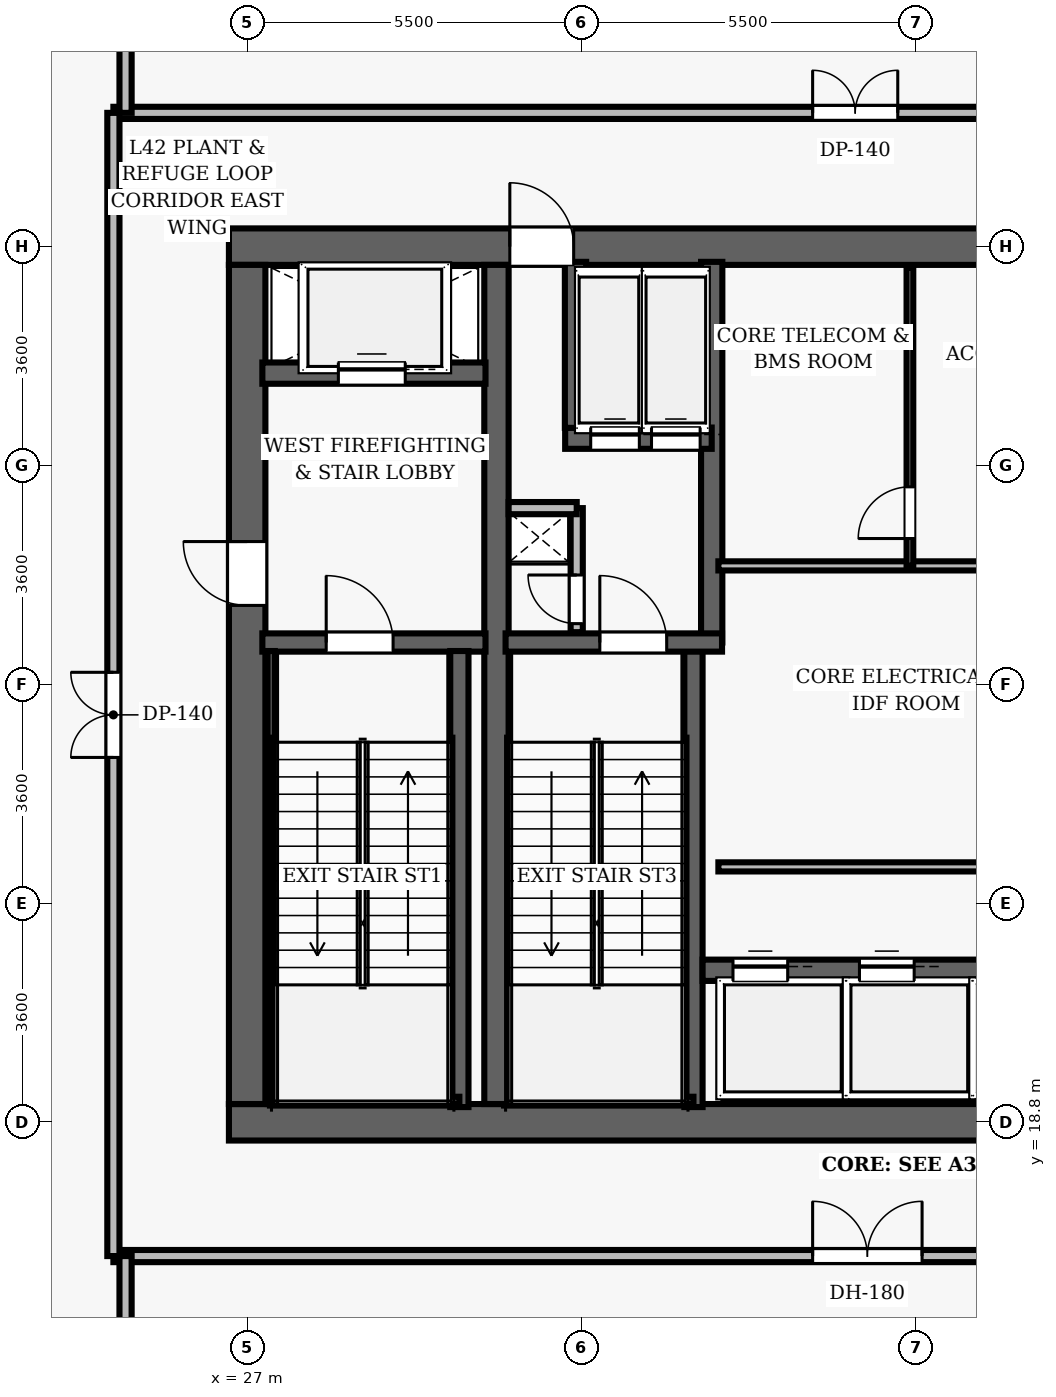
"""IFC4 building model, lengths in metres.
Left out: names, types, materials, properties, quantities, classifications, styles, units other than length and angle.
Written with IfcOpenShell. Run it as: python <this file> out.ifc"""

import sys

from ifc_helpers import new_model, si_unit, direction, frame, frame_2d, origin, place, context, subcontext, project, spatial, rectangle, extrude, element, fill, save


model = new_model("IFC4")
c1 = context("Model", 3, precision=1e-05, world=origin(), true_north=direction((0.0, 1.0)))
c2 = subcontext(c1, "Body", "Model", "MODEL_VIEW")
j1 = project(units=[si_unit("LENGTHUNIT", "METRE"), si_unit("PLANEANGLEUNIT", "RADIAN")], contexts=[c1])
p1 = place(None, origin())
s1 = spatial("IfcSite", under=j1, at=p1, CompositionType="ELEMENT")
p2 = place(p1, origin())
s2 = spatial("IfcBuilding", under=s1, at=p2, CompositionType="ELEMENT")
p3 = place(p2, frame((0.0, 0.0, 165.8)))
s3 = spatial("IfcBuildingStorey", under=s2, at=p3, CompositionType="ELEMENT", Elevation=165.8)
p4 = place(p3, frame((26.7, 18.8, 0.0), z_axis=(0.0, 0.0, 1.0), x_axis=(1.0, 0.0, 0.0)))
e1 = element("IfcWall", 1, at=p4, inside=s3, PredefinedType="SHEAR", context=c2, shape_type="SweptSolid", body=[
    extrude(rectangle(XDim=22.6, YDim=0.6, at=frame_2d((11.3, 0.0))), origin(), (0.0, 0.0, 1.0), 5.4),
])
p5 = place(p4, frame((14.52, 0.0, 0.0)))
e2 = element("IfcOpeningElement", 2, at=p5, cuts=e1, PredefinedType="OPENING", context=c2, shape_type="SweptSolid", body=[
    extrude(rectangle(XDim=1.05, YDim=2.15, at=frame_2d((0.525, 1.075))), frame((0.0, 0.31, 0.0), z_axis=(0.0, -1.0, 0.0), x_axis=(1.0, 0.0, 0.0)), (0.0, 0.0, 1.0), 0.62),
])
p6 = place(p3, frame((26.7, 33.2, 0.0), z_axis=(0.0, 0.0, 1.0), x_axis=(1.0, 0.0, 0.0)))
e3 = element("IfcWall", 3, at=p6, inside=s3, PredefinedType="SHEAR", context=c2, shape_type="SweptSolid", body=[
    extrude(rectangle(XDim=22.6, YDim=0.6, at=frame_2d((11.3, 0.0))), origin(), (0.0, 0.0, 1.0), 5.4),
])
p7 = place(p6, frame((4.62, 0.0, 0.0)))
e4 = element("IfcOpeningElement", 4, at=p7, cuts=e3, PredefinedType="OPENING", context=c2, shape_type="SweptSolid", body=[
    extrude(rectangle(XDim=1.05, YDim=2.15, at=frame_2d((0.525, 1.075))), frame((0.0, 0.31, 0.0), z_axis=(0.0, -1.0, 0.0), x_axis=(1.0, 0.0, 0.0)), (0.0, 0.0, 1.0), 0.62),
])
p8 = place(p6, frame((14.52, 0.0, 0.0)))
e5 = element("IfcOpeningElement", 5, at=p8, cuts=e3, PredefinedType="OPENING", context=c2, shape_type="SweptSolid", body=[
    extrude(rectangle(XDim=1.05, YDim=2.15, at=frame_2d((0.525, 1.075))), frame((0.0, 0.31, 0.0), z_axis=(0.0, -1.0, 0.0), x_axis=(1.0, 0.0, 0.0)), (0.0, 0.0, 1.0), 0.62),
])
p9 = place(p3, frame((27.0, 19.1, 0.0), z_axis=(0.0, 0.0, 1.0), x_axis=(0.0, 1.0, 0.0)))
e6 = element("IfcWall", 6, at=p9, inside=s3, PredefinedType="SHEAR", context=c2, shape_type="SweptSolid", body=[
    extrude(rectangle(XDim=13.8, YDim=0.6, at=frame_2d((6.9, 0.0))), origin(), (0.0, 0.0, 1.0), 5.4),
])
p10 = place(p9, frame((8.2, 0.0, 0.0)))
e7 = element("IfcOpeningElement", 7, at=p10, cuts=e6, PredefinedType="OPENING", context=c2, shape_type="SweptSolid", body=[
    extrude(rectangle(XDim=1.05, YDim=2.15, at=frame_2d((0.525, 1.075))), frame((0.0, 0.31, 0.0), z_axis=(0.0, -1.0, 0.0), x_axis=(1.0, 0.0, 0.0)), (0.0, 0.0, 1.0), 0.62),
])
p11 = place(p3, frame((31.1, 19.1, 0.0), z_axis=(0.0, 0.0, 1.0), x_axis=(0.0, 1.0, 0.0)))
e8 = element("IfcWall", 8, at=p11, inside=s3, PredefinedType="SHEAR", context=c2, shape_type="SweptSolid", body=[
    extrude(rectangle(XDim=13.8, YDim=0.4, at=frame_2d((6.9, 0.0))), origin(), (0.0, 0.0, 1.0), 5.4),
])
p12 = place(p3, frame((27.25, 26.69, 0.0), z_axis=(0.0, 0.0, 1.0), x_axis=(1.0, 0.0, 0.0)))
e9 = element("IfcWall", 9, at=p12, inside=s3, PredefinedType="SHEAR", context=c2, shape_type="SweptSolid", body=[
    extrude(rectangle(XDim=3.67, YDim=0.3, at=frame_2d((1.835, 0.0))), origin(), (0.0, 0.0, 1.0), 5.4),
])
p13 = place(p12, frame((1.05, 0.0, 0.0)))
e10 = element("IfcOpeningElement", 10, at=p13, cuts=e9, PredefinedType="OPENING", context=c2, shape_type="SweptSolid", body=[
    extrude(rectangle(XDim=1.1, YDim=2.15, at=frame_2d((0.55, 1.075))), frame((0.0, 0.16, 0.0), z_axis=(0.0, -1.0, 0.0), x_axis=(1.0, 0.0, 0.0)), (0.0, 0.0, 1.0), 0.32),
])
p14 = place(p3, frame((30.49, 19.05, 0.0), z_axis=(0.0, 0.0, 1.0), x_axis=(0.0, 1.0, 0.0)))
e11 = element("IfcWall", 11, at=p14, inside=s3, PredefinedType="SHEAR", context=c2, shape_type="SweptSolid", body=[
    extrude(rectangle(XDim=7.5, YDim=0.3, at=frame_2d((3.75, 0.0))), origin(), (0.0, 0.0, 1.0), 5.4),
])
p15 = place(p3, frame((27.395, 19.1, 0.0), z_axis=(0.0, 0.0, 1.0), x_axis=(0.0, 1.0, 0.0)))
e12 = element("IfcWall", 12, at=p15, inside=s3, PredefinedType="SHEAR", context=c2, shape_type="SweptSolid", body=[
    extrude(rectangle(XDim=7.45, YDim=0.12, at=frame_2d((3.725, 0.0))), origin(), (0.0, 0.0, 1.0), 5.4),
])
p16 = place(p3, frame((27.395, 19.16, 0.0), z_axis=(0.0, 0.0, 1.0), x_axis=(1.0, 0.0, 0.0)))
e13 = element("IfcWall", 13, at=p16, inside=s3, PredefinedType="SHEAR", context=c2, shape_type="SweptSolid", body=[
    extrude(rectangle(XDim=3.095, YDim=0.12, at=frame_2d((1.547, 0.0))), origin(), (0.0, 0.0, 1.0), 5.4),
])
p17 = place(p3, frame((27.25, 31.12, 0.0), z_axis=(0.0, 0.0, 1.0), x_axis=(1.0, 0.0, 0.0)))
e14 = element("IfcWall", 14, at=p17, inside=s3, PredefinedType="SHEAR", context=c2, shape_type="SweptSolid", body=[
    extrude(rectangle(XDim=3.67, YDim=0.35, at=frame_2d((1.835, 0.0))), origin(), (0.0, 0.0, 1.0), 4.04),
])
p18 = place(p17, frame((1.25, 0.0, 0.0)))
e15 = element("IfcOpeningElement", 15, at=p18, cuts=e14, PredefinedType="OPENING", context=c2, shape_type="SweptSolid", body=[
    extrude(rectangle(XDim=1.1, YDim=2.15, at=frame_2d((0.55, 1.075))), frame((0.0, 0.185, 0.0), z_axis=(0.0, -1.0, 0.0), x_axis=(1.0, 0.0, 0.0)), (0.0, 0.0, 1.0), 0.37),
])
p19 = place(p3, frame((34.34, 19.05, 0.0), z_axis=(0.0, 0.0, 1.0), x_axis=(0.0, 1.0, 0.0)))
e16 = element("IfcWall", 16, at=p19, inside=s3, PredefinedType="SHEAR", context=c2, shape_type="SweptSolid", body=[
    extrude(rectangle(XDim=7.5, YDim=0.3, at=frame_2d((3.75, 0.0))), origin(), (0.0, 0.0, 1.0), 5.4),
])
p20 = place(p3, frame((34.64, 26.69, 0.0), z_axis=(0.0, 0.0, 1.0), x_axis=(0.0, 1.0, 0.0)))
e17 = element("IfcWall", 17, at=p20, inside=s3, PredefinedType="SHEAR", context=c2, shape_type="SweptSolid", body=[
    extrude(rectangle(XDim=6.26, YDim=0.35, at=frame_2d((3.13, 0.0))), origin(), (0.0, 0.0, 1.0), 5.4),
])
p21 = place(p3, frame((31.25, 26.69, 0.0), z_axis=(0.0, 0.0, 1.0), x_axis=(1.0, 0.0, 0.0)))
e18 = element("IfcWall", 18, at=p21, inside=s3, PredefinedType="SHEAR", context=c2, shape_type="SweptSolid", body=[
    extrude(rectangle(XDim=3.56, YDim=0.3, at=frame_2d((1.78, 0.0))), origin(), (0.0, 0.0, 1.0), 5.4),
])
p22 = place(p21, frame((1.55, 0.0, 0.0)))
e19 = element("IfcOpeningElement", 19, at=p22, cuts=e18, PredefinedType="OPENING", context=c2, shape_type="SweptSolid", body=[
    extrude(rectangle(XDim=1.1, YDim=2.15, at=frame_2d((0.55, 1.075))), frame((0.0, 0.16, 0.0), z_axis=(0.0, -1.0, 0.0), x_axis=(1.0, 0.0, 0.0)), (0.0, 0.0, 1.0), 0.32),
])
p23 = place(p3, frame((31.3, 19.16, 0.0), z_axis=(0.0, 0.0, 1.0), x_axis=(1.0, 0.0, 0.0)))
e20 = element("IfcWall", 20, at=p23, inside=s3, PredefinedType="SHEAR", context=c2, shape_type="SweptSolid", body=[
    extrude(rectangle(XDim=3.04, YDim=0.12, at=frame_2d((1.52, 0.0))), origin(), (0.0, 0.0, 1.0), 5.4),
])
p24 = place(p3, frame((32.23, 30.05, 0.0), z_axis=(0.0, 0.0, 1.0), x_axis=(1.0, 0.0, 0.0)))
e21 = element("IfcWall", 21, at=p24, inside=s3, PredefinedType="SHEAR", context=c2, shape_type="SweptSolid", body=[
    extrude(rectangle(XDim=2.41, YDim=0.35, at=frame_2d((1.205, 0.0))), origin(), (0.0, 0.0, 1.0), 4.04),
])
p25 = place(p24, frame((0.42, 0.0, 0.0)))
e22 = element("IfcOpeningElement", 22, at=p25, cuts=e21, PredefinedType="OPENING", context=c2, shape_type="SweptSolid", body=[
    extrude(rectangle(XDim=0.8, YDim=2.15, at=frame_2d((0.4, 1.075))), frame((0.0, 0.185, 0.0), z_axis=(0.0, -1.0, 0.0), x_axis=(1.0, 0.0, 0.0)), (0.0, 0.0, 1.0), 0.37),
])
p26 = place(p24, frame((1.42, 0.0, 0.0)))
e23 = element("IfcOpeningElement", 23, at=p26, cuts=e21, PredefinedType="OPENING", context=c2, shape_type="SweptSolid", body=[
    extrude(rectangle(XDim=0.8, YDim=2.15, at=frame_2d((0.4, 1.075))), frame((0.0, 0.185, 0.0), z_axis=(0.0, -1.0, 0.0), x_axis=(1.0, 0.0, 0.0)), (0.0, 0.0, 1.0), 0.37),
])
p27 = place(p3, frame((32.4, 30.22, 0.0), z_axis=(0.0, 0.0, 1.0), x_axis=(0.0, 1.0, 0.0)))
e24 = element("IfcWall", 24, at=p27, inside=s3, PredefinedType="SHEAR", context=c2, shape_type="SweptSolid", body=[
    extrude(rectangle(XDim=2.73, YDim=0.35, at=frame_2d((1.365, 0.0))), origin(), (0.0, 0.0, 1.0), 4.04),
])
p28 = place(p3, frame((32.42, 26.86, 0.0), z_axis=(0.0, 0.0, 1.0), x_axis=(0.0, 1.0, 0.0)))
e25 = element("IfcWall", 25, at=p28, inside=s3, PredefinedType="PARTITIONING", context=c2, shape_type="SweptSolid", body=[
    extrude(rectangle(XDim=2.04, YDim=0.2, at=frame_2d((1.02, 0.0))), origin(), (0.0, 0.0, 1.0), 4.04),
])
p29 = place(p28, frame((0.14, 0.0, 0.0)))
e26 = element("IfcOpeningElement", 26, at=p29, cuts=e25, PredefinedType="OPENING", context=c2, shape_type="SweptSolid", body=[
    extrude(rectangle(XDim=0.8, YDim=2.05, at=frame_2d((0.4, 1.025))), frame((0.0, 0.11, 0.0), z_axis=(0.0, -1.0, 0.0), x_axis=(1.0, 0.0, 0.0)), (0.0, 0.0, 1.0), 0.22),
])
p30 = place(p3, frame((31.3, 28.9, 0.0), z_axis=(0.0, 0.0, 1.0), x_axis=(1.0, 0.0, 0.0)))
e27 = element("IfcWall", 27, at=p30, inside=s3, PredefinedType="PARTITIONING", context=c2, shape_type="SweptSolid", body=[
    extrude(rectangle(XDim=1.12, YDim=0.2, at=frame_2d((0.56, 0.0))), origin(), (0.0, 0.0, 1.0), 4.04),
])
p31 = place(p3, frame((34.49, 21.3, 0.0), z_axis=(0.0, 0.0, 1.0), x_axis=(1.0, 0.0, 0.0)))
e28 = element("IfcWall", 28, at=p31, inside=s3, PredefinedType="SHEAR", context=c2, shape_type="SweptSolid", body=[
    extrude(rectangle(XDim=6.68, YDim=0.35, at=frame_2d((3.34, 0.0))), origin(), (0.0, 0.0, 1.0), 4.04),
])
p32 = place(p31, frame((0.5, 0.0, 0.0)))
e29 = element("IfcOpeningElement", 29, at=p32, cuts=e28, PredefinedType="OPENING", context=c2, shape_type="SweptSolid", body=[
    extrude(rectangle(XDim=0.9, YDim=2.15, at=frame_2d((0.45, 1.075))), frame((0.0, 0.185, 0.0), z_axis=(0.0, -1.0, 0.0), x_axis=(1.0, 0.0, 0.0)), (0.0, 0.0, 1.0), 0.37),
])
p33 = place(p31, frame((2.58, 0.0, 0.0)))
e30 = element("IfcOpeningElement", 30, at=p33, cuts=e28, PredefinedType="OPENING", context=c2, shape_type="SweptSolid", body=[
    extrude(rectangle(XDim=0.9, YDim=2.15, at=frame_2d((0.45, 1.075))), frame((0.0, 0.185, 0.0), z_axis=(0.0, -1.0, 0.0), x_axis=(1.0, 0.0, 0.0)), (0.0, 0.0, 1.0), 0.37),
])
p34 = place(p31, frame((4.66, 0.0, 0.0)))
e31 = element("IfcOpeningElement", 31, at=p34, cuts=e28, PredefinedType="OPENING", context=c2, shape_type="SweptSolid", body=[
    extrude(rectangle(XDim=0.9, YDim=2.15, at=frame_2d((0.45, 1.075))), frame((0.0, 0.185, 0.0), z_axis=(0.0, -1.0, 0.0), x_axis=(1.0, 0.0, 0.0)), (0.0, 0.0, 1.0), 0.37),
])
for number, where, z_axis, x_axis in (
    (32, (34.75, 23.0, 0.0), (0.0, 0.0, 1.0), (1.0, 0.0, 0.0)),
    (33, (34.75, 27.95, 0.0), (0.0, 0.0, 1.0), (1.0, 0.0, 0.0)),
):
    element("IfcWall", number, at=place(p3, frame(where, z_axis=z_axis, x_axis=x_axis)), inside=s3, PredefinedType="PARTITIONING", context=c2, shape_type="SweptSolid", body=[
        extrude(rectangle(XDim=6.25, YDim=0.15, at=frame_2d((3.125, 0.0))), origin(), (0.0, 0.0, 1.0), 4.04),
    ])
p35 = place(p3, frame((37.9, 27.95, 0.0), z_axis=(0.0, 0.0, 1.0), x_axis=(0.0, 1.0, 0.0)))
e34 = element("IfcWall", 34, at=p35, inside=s3, PredefinedType="PARTITIONING", context=c2, shape_type="SweptSolid", body=[
    extrude(rectangle(XDim=4.9, YDim=0.11, at=frame_2d((2.45, 0.0))), origin(), (0.0, 0.0, 1.0), 4.04),
])
p36 = place(p35, frame((0.45, 0.0, 0.0)))
e35 = element("IfcOpeningElement", 35, at=p36, cuts=e34, PredefinedType="OPENING", context=c2, shape_type="SweptSolid", body=[
    extrude(rectangle(XDim=0.85, YDim=2.1, at=frame_2d((0.425, 1.05))), frame((0.0, 0.065, 0.0), z_axis=(0.0, -1.0, 0.0), x_axis=(1.0, 0.0, 0.0)), (0.0, 0.0, 1.0), 0.13),
])
p37 = place(p3, frame((24.8, 35.4, 0.0), z_axis=(0.0, 0.0, 1.0), x_axis=(1.0, 0.0, 0.0)))
e36 = element("IfcWall", 36, at=p37, inside=s3, PredefinedType="PARTITIONING", context=c2, shape_type="SweptSolid", body=[
    extrude(rectangle(XDim=26.4, YDim=0.2, at=frame_2d((13.2, 0.0))), origin(), (0.0, 0.0, 1.0), 4.04),
])
p38 = place(p37, frame((11.5, 0.0, 0.0)))
e37 = element("IfcOpeningElement", 37, at=p38, cuts=e36, PredefinedType="OPENING", context=c2, shape_type="SweptSolid", body=[
    extrude(rectangle(XDim=1.4, YDim=2.25, at=frame_2d((0.7, 1.125))), frame((0.0, 0.11, 0.0), z_axis=(0.0, -1.0, 0.0), x_axis=(1.0, 0.0, 0.0)), (0.0, 0.0, 1.0), 0.22),
])
p39 = place(p3, frame((24.8, 16.6, 0.0), z_axis=(0.0, 0.0, 1.0), x_axis=(1.0, 0.0, 0.0)))
e38 = element("IfcWall", 38, at=p39, inside=s3, PredefinedType="PARTITIONING", context=c2, shape_type="SweptSolid", body=[
    extrude(rectangle(XDim=26.4, YDim=0.2, at=frame_2d((13.2, 0.0))), origin(), (0.0, 0.0, 1.0), 4.04),
])
p40 = place(p39, frame((11.5, 0.0, 0.0)))
e39 = element("IfcOpeningElement", 39, at=p40, cuts=e38, PredefinedType="OPENING", context=c2, shape_type="SweptSolid", body=[
    extrude(rectangle(XDim=1.8, YDim=2.35, at=frame_2d((0.9, 1.175))), frame((0.0, 0.11, 0.0), z_axis=(0.0, -1.0, 0.0), x_axis=(1.0, 0.0, 0.0)), (0.0, 0.0, 1.0), 0.22),
])
p41 = place(p3, frame((24.8, 16.6, 0.0), z_axis=(0.0, 0.0, 1.0), x_axis=(0.0, 1.0, 0.0)))
e40 = element("IfcWall", 40, at=p41, inside=s3, PredefinedType="PARTITIONING", context=c2, shape_type="SweptSolid", body=[
    extrude(rectangle(XDim=18.8, YDim=0.2, at=frame_2d((9.4, 0.0))), origin(), (0.0, 0.0, 1.0), 4.04),
])
p42 = place(p41, frame((8.2, 0.0, 0.0)))
e41 = element("IfcOpeningElement", 41, at=p42, cuts=e40, PredefinedType="OPENING", context=c2, shape_type="SweptSolid", body=[
    extrude(rectangle(XDim=1.4, YDim=2.25, at=frame_2d((0.7, 1.125))), frame((0.0, 0.11, 0.0), z_axis=(0.0, -1.0, 0.0), x_axis=(1.0, 0.0, 0.0)), (0.0, 0.0, 1.0), 0.22),
])
p43 = place(p3, frame((25.0, 8.63, 0.0), z_axis=(0.0, 0.0, 1.0), x_axis=(0.0, 1.0, 0.0)))
e42 = element("IfcWall", 42, at=p43, inside=s3, PredefinedType="PARTITIONING", context=c2, shape_type="SweptSolid", body=[
    extrude(rectangle(XDim=7.97, YDim=0.2, at=frame_2d((3.985, 0.0))), origin(), (0.0, 0.0, 1.0), 4.04),
])
p44 = place(p3, frame((25.0, 35.4, 0.0), z_axis=(0.0, 0.0, 1.0), x_axis=(0.0, 1.0, 0.0)))
e43 = element("IfcWall", 43, at=p44, inside=s3, PredefinedType="PARTITIONING", context=c2, shape_type="SweptSolid", body=[
    extrude(rectangle(XDim=12.146, YDim=0.2, at=frame_2d((6.073, 0.0))), origin(), (0.0, 0.0, 1.0), 4.04),
])
p45 = place(p13, origin())
e44 = element("IfcDoor", 44, at=p45, inside=s3, OperationType="SINGLE_SWING_LEFT", PredefinedType="DOOR", context=c2, shape_type="SweptSolid", body=[
    extrude(rectangle(XDim=1.1, YDim=2.15, at=frame_2d((0.55, 1.075))), frame((0.0, 0.025, 0.0), z_axis=(0.0, -1.0, 0.0), x_axis=(1.0, 0.0, 0.0)), (0.0, 0.0, 1.0), 0.05),
])
fill(e10, e44)
p46 = place(p10, origin())
e45 = element("IfcDoor", 45, at=p46, inside=s3, OperationType="SINGLE_SWING_RIGHT", PredefinedType="DOOR", context=c2, shape_type="SweptSolid", body=[
    extrude(rectangle(XDim=1.05, YDim=2.15, at=frame_2d((0.525, 1.075))), frame((0.0, 0.025, 0.0), z_axis=(0.0, -1.0, 0.0), x_axis=(1.0, 0.0, 0.0)), (0.0, 0.0, 1.0), 0.05),
])
fill(e7, e45)
p47 = place(p22, origin())
e46 = element("IfcDoor", 46, at=p47, inside=s3, OperationType="SINGLE_SWING_LEFT", PredefinedType="DOOR", context=c2, shape_type="SweptSolid", body=[
    extrude(rectangle(XDim=1.1, YDim=2.15, at=frame_2d((0.55, 1.075))), frame((0.0, 0.025, 0.0), z_axis=(0.0, -1.0, 0.0), x_axis=(1.0, 0.0, 0.0)), (0.0, 0.0, 1.0), 0.05),
])
fill(e19, e46)
p48 = place(p29, origin())
e47 = element("IfcDoor", 47, at=p48, inside=s3, OperationType="SINGLE_SWING_RIGHT", PredefinedType="DOOR", context=c2, shape_type="SweptSolid", body=[
    extrude(rectangle(XDim=0.8, YDim=2.05, at=frame_2d((0.4, 1.025))), frame((0.0, 0.025, 0.0), z_axis=(0.0, -1.0, 0.0), x_axis=(1.0, 0.0, 0.0)), (0.0, 0.0, 1.0), 0.05),
])
fill(e26, e47)
p49 = place(p7, origin())
e48 = element("IfcDoor", 48, at=p49, inside=s3, OperationType="SINGLE_SWING_LEFT", PredefinedType="DOOR", context=c2, shape_type="SweptSolid", body=[
    extrude(rectangle(XDim=1.05, YDim=2.15, at=frame_2d((0.525, 1.075))), frame((0.0, 0.025, 0.0), z_axis=(0.0, -1.0, 0.0), x_axis=(1.0, 0.0, 0.0)), (0.0, 0.0, 1.0), 0.05),
])
fill(e4, e48)
p50 = place(p36, origin())
e49 = element("IfcDoor", 49, at=p50, inside=s3, OperationType="SINGLE_SWING_LEFT", PredefinedType="DOOR", context=c2, shape_type="SweptSolid", body=[
    extrude(rectangle(XDim=0.85, YDim=2.1, at=frame_2d((0.425, 1.05))), frame((0.0, 0.025, 0.0), z_axis=(0.0, -1.0, 0.0), x_axis=(1.0, 0.0, 0.0)), (0.0, 0.0, 1.0), 0.05),
])
fill(e35, e49)
p51 = place(p40, origin())
e50 = element("IfcDoor", 50, at=p51, inside=s3, OperationType="DOUBLE_DOOR_SINGLE_SWING", PredefinedType="DOOR", context=c2, shape_type="SweptSolid", body=[
    extrude(rectangle(XDim=1.8, YDim=2.35, at=frame_2d((0.9, 1.175))), frame((0.0, 0.025, 0.0), z_axis=(0.0, -1.0, 0.0), x_axis=(1.0, 0.0, 0.0)), (0.0, 0.0, 1.0), 0.05),
])
fill(e39, e50)
p52 = place(p38, origin())
e51 = element("IfcDoor", 51, at=p52, inside=s3, OperationType="DOUBLE_DOOR_SINGLE_SWING", PredefinedType="DOOR", context=c2, shape_type="SweptSolid", body=[
    extrude(rectangle(XDim=1.4, YDim=2.25, at=frame_2d((0.7, 1.125))), frame((0.0, 0.025, 0.0), z_axis=(0.0, -1.0, 0.0), x_axis=(1.0, 0.0, 0.0)), (0.0, 0.0, 1.0), 0.05),
])
fill(e37, e51)
p53 = place(p42, origin())
e52 = element("IfcDoor", 52, at=p53, inside=s3, OperationType="DOUBLE_DOOR_SINGLE_SWING", PredefinedType="DOOR", context=c2, shape_type="SweptSolid", body=[
    extrude(rectangle(XDim=1.4, YDim=2.25, at=frame_2d((0.7, 1.125))), frame((0.0, 0.025, 0.0), z_axis=(0.0, -1.0, 0.0), x_axis=(1.0, 0.0, 0.0)), (0.0, 0.0, 1.0), 0.05),
])
fill(e41, e52)
p54 = place(p32, origin())
e53 = element("IfcDoor", 53, at=p54, inside=s3, OperationType="SLIDING_TO_LEFT", PredefinedType="DOOR", context=c2, shape_type="SweptSolid", body=[
    extrude(rectangle(XDim=0.9, YDim=2.15, at=frame_2d((0.45, 1.075))), frame((0.0, 0.025, 0.0), z_axis=(0.0, -1.0, 0.0), x_axis=(1.0, 0.0, 0.0)), (0.0, 0.0, 1.0), 0.05),
])
fill(e29, e53)
p55 = place(p33, origin())
e54 = element("IfcDoor", 54, at=p55, inside=s3, OperationType="SLIDING_TO_LEFT", PredefinedType="DOOR", context=c2, shape_type="SweptSolid", body=[
    extrude(rectangle(XDim=0.9, YDim=2.15, at=frame_2d((0.45, 1.075))), frame((0.0, 0.025, 0.0), z_axis=(0.0, -1.0, 0.0), x_axis=(1.0, 0.0, 0.0)), (0.0, 0.0, 1.0), 0.05),
])
fill(e30, e54)
p56 = place(p18, origin())
e55 = element("IfcDoor", 55, at=p56, inside=s3, OperationType="SLIDING_TO_LEFT", PredefinedType="DOOR", context=c2, shape_type="SweptSolid", body=[
    extrude(rectangle(XDim=1.1, YDim=2.15, at=frame_2d((0.55, 1.075))), frame((0.0, 0.025, 0.0), z_axis=(0.0, -1.0, 0.0), x_axis=(1.0, 0.0, 0.0)), (0.0, 0.0, 1.0), 0.05),
])
fill(e15, e55)
p57 = place(p25, origin())
e56 = element("IfcDoor", 56, at=p57, inside=s3, OperationType="SLIDING_TO_LEFT", PredefinedType="DOOR", context=c2, shape_type="SweptSolid", body=[
    extrude(rectangle(XDim=0.8, YDim=2.15, at=frame_2d((0.4, 1.075))), frame((0.0, 0.025, 0.0), z_axis=(0.0, -1.0, 0.0), x_axis=(1.0, 0.0, 0.0)), (0.0, 0.0, 1.0), 0.05),
])
fill(e22, e56)
p58 = place(p26, origin())
e57 = element("IfcDoor", 57, at=p58, inside=s3, OperationType="SLIDING_TO_LEFT", PredefinedType="DOOR", context=c2, shape_type="SweptSolid", body=[
    extrude(rectangle(XDim=0.8, YDim=2.15, at=frame_2d((0.4, 1.075))), frame((0.0, 0.025, 0.0), z_axis=(0.0, -1.0, 0.0), x_axis=(1.0, 0.0, 0.0)), (0.0, 0.0, 1.0), 0.05),
])
fill(e23, e57)
save(model, sys.argv[1])
